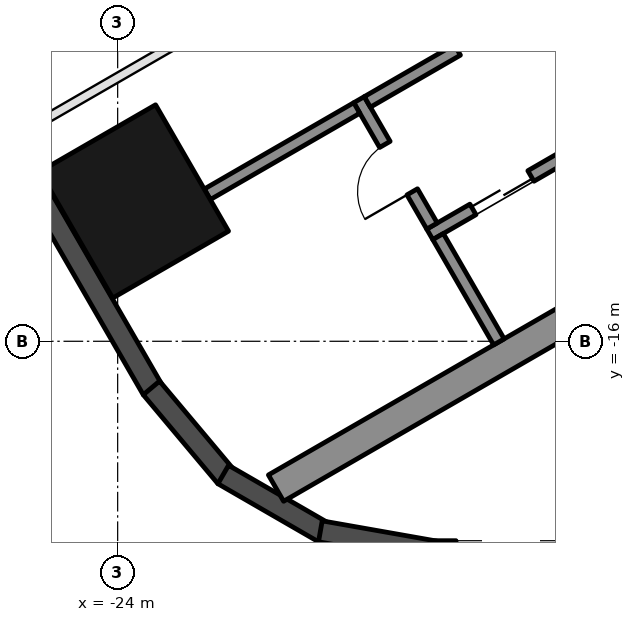
"""IFC4 building model, lengths in metres.
Left out: names, types, materials, properties, quantities, classifications, styles, units other than length and angle.
Written with IfcOpenShell. Run it as: python <this file> out.ifc"""

import sys

from ifc_helpers import new_model, si_unit, direction, frame, frame_2d, origin, origin_2d, place, context, subcontext, project, spatial, rectangle, hollow_rectangle, extrude, element, fill, save


model = new_model("IFC4")
c1 = context("Model", 3, precision=1e-05, world=origin(), true_north=direction((0.0, 1.0)))
c2 = subcontext(c1, "Body", "Model", "MODEL_VIEW")
j1 = project(units=[si_unit("LENGTHUNIT", "METRE"), si_unit("PLANEANGLEUNIT", "RADIAN")], contexts=[c1])
p1 = place(None, origin())
s1 = spatial("IfcSite", under=j1, at=p1, CompositionType="ELEMENT")
p2 = place(p1, origin())
s2 = spatial("IfcBuilding", under=s1, at=p2, CompositionType="ELEMENT")
p3 = place(p2, frame((0.0, 0.0, 157.7)))
s3 = spatial("IfcBuildingStorey", under=s2, at=p3, CompositionType="ELEMENT", Elevation=157.7)
p4 = place(p3, frame((-23.729, -13.7, 0.0), z_axis=(0.0, 0.0, 1.0), x_axis=(-0.5, 0.866025403784, 0.0)))
e1 = element("IfcColumn", 1, at=p4, inside=s3, PredefinedType="COLUMN", context=c2, shape_type="SweptSolid", body=[
    extrude(hollow_rectangle(XDim=2.4, YDim=2.2, WallThickness=0.06, at=origin_2d()), origin(), (0.0, 0.0, 1.0), 3.7),
])
p5 = place(p3, frame((-26.257, -11.893, 0.0), z_axis=(0.0, 0.0, 1.0), x_axis=(0.500018773155, -0.866014564827, 0.0)))
e2 = element("IfcWall", 2, at=p5, inside=s3, PredefinedType="SOLIDWALL", context=c2, shape_type="SweptSolid", body=[
    extrude(rectangle(XDim=5.658, YDim=0.35, at=frame_2d((2.829, 0.0))), origin(), (0.0, 0.0, 1.0), 3.55),
])
for number, where, z_axis, x_axis in (
    (3, (-23.445, -16.768, 0.0), (0.0, 0.0, 1.0), (0.643, -0.766, 0.0)),
    (4, (-22.264, -18.192, 0.0), (0.0, 0.0, 1.0), (0.866, -0.5, 0.0)),
):
    element("IfcWall", number, at=place(p3, frame(where, z_axis=z_axis, x_axis=x_axis)), inside=s3, PredefinedType="SOLIDWALL", context=c2, shape_type="SweptSolid", body=[
        extrude(rectangle(XDim=1.91, YDim=0.35, at=frame_2d((0.955, 0.0))), origin(), (0.0, 0.0, 1.0), 3.55),
    ])
p6 = place(p3, frame((-20.667, -19.126, 0.0), z_axis=(0.0, 0.0, 1.0), x_axis=(0.984798995425, -0.173697837091, 0.0)))
e5 = element("IfcWall", 5, at=p6, inside=s3, PredefinedType="SOLIDWALL", context=c2, shape_type="SweptSolid", body=[
    extrude(rectangle(XDim=1.91, YDim=0.35, at=frame_2d((0.955, 0.0))), origin(), (0.0, 0.0, 1.0), 3.55),
])
p7 = place(p3, frame((-18.816, -19.455, 0.0), z_axis=(0.0, 0.0, 1.0), x_axis=(1.0, 0.0, 0.0)))
e6 = element("IfcWall", 6, at=p7, inside=s3, PredefinedType="SOLIDWALL", context=c2, shape_type="SweptSolid", body=[
    extrude(rectangle(XDim=11.816, YDim=0.35, at=frame_2d((5.908, 0.0))), origin(), (0.0, 0.0, 1.0), 3.55),
])
p8 = place(p7, frame((0.381, 0.0, 0.3)))
e7 = element("IfcOpeningElement", 7, at=p8, cuts=e6, PredefinedType="OPENING", context=c2, shape_type="SweptSolid", body=[
    extrude(rectangle(XDim=1.8, YDim=2.65, at=frame_2d((0.9, 1.325))), frame((0.0, 0.185, 0.0), z_axis=(0.0, -1.0, 0.0), x_axis=(1.0, 0.0, 0.0)), (0.0, 0.0, 1.0), 0.37),
])
p9 = place(p7, frame((7.74, 0.0, 0.0)))
e8 = element("IfcOpeningElement", 8, at=p9, cuts=e6, PredefinedType="OPENING", context=c2, shape_type="SweptSolid", body=[
    extrude(rectangle(XDim=2.4, YDim=2.4, at=frame_2d((1.2, 1.2))), frame((0.0, 0.185, 0.0), z_axis=(0.0, -1.0, 0.0), x_axis=(1.0, 0.0, 0.0)), (0.0, 0.0, 1.0), 0.37),
])
p10 = place(p7, frame((3.791, 0.0, 0.3)))
e9 = element("IfcOpeningElement", 9, at=p10, cuts=e6, PredefinedType="OPENING", context=c2, shape_type="SweptSolid", body=[
    extrude(rectangle(XDim=1.6, YDim=2.65, at=frame_2d((0.8, 1.325))), frame((0.0, 0.185, 0.0), z_axis=(0.0, -1.0, 0.0), x_axis=(1.0, 0.0, 0.0)), (0.0, 0.0, 1.0), 0.37),
])
p11 = place(p7, frame((5.691, 0.0, 0.3)))
e10 = element("IfcOpeningElement", 10, at=p11, cuts=e6, PredefinedType="OPENING", context=c2, shape_type="SweptSolid", body=[
    extrude(rectangle(XDim=1.6, YDim=2.65, at=frame_2d((0.8, 1.325))), frame((0.0, 0.185, 0.0), z_axis=(0.0, -1.0, 0.0), x_axis=(1.0, 0.0, 0.0)), (0.0, 0.0, 1.0), 0.37),
])
p12 = place(p3, frame((-8.547, -10.997, 0.0), z_axis=(0.0, 0.0, 1.0), x_axis=(-0.866025009528, -0.500000682871, 0.0)))
e11 = element("IfcWall", 11, at=p12, inside=s3, PredefinedType="SHEAR", context=c2, shape_type="SweptSolid", body=[
    extrude(rectangle(XDim=14.837, YDim=0.5, at=frame_2d((7.418, 0.0))), origin(), (0.0, 0.0, 1.0), 3.5),
])
p13 = place(p3, frame((-10.068, -9.162, 0.0), z_axis=(0.0, 0.0, 1.0), x_axis=(-0.866032725843, -0.499987317609, 0.0)))
e12 = element("IfcWall", 12, at=p13, inside=s3, PredefinedType="SHEAR", context=c2, shape_type="SweptSolid", body=[
    extrude(rectangle(XDim=10.16, YDim=0.2, at=frame_2d((5.08, 0.0))), origin(), (0.0, 0.0, 1.0), 3.5),
])
p14 = place(p13, frame((0.62, 0.0, 0.0)))
e13 = element("IfcOpeningElement", 13, at=p14, cuts=e12, PredefinedType="OPENING", context=c2, shape_type="SweptSolid", body=[
    extrude(rectangle(XDim=1.1, YDim=2.1, at=frame_2d((0.55, 1.05))), frame((0.0, 0.11, 0.0), z_axis=(0.0, -1.0, 0.0), x_axis=(1.0, 0.0, 0.0)), (0.0, 0.0, 1.0), 0.22),
])
p15 = place(p13, frame((3.16, 0.0, 0.0)))
e14 = element("IfcOpeningElement", 14, at=p15, cuts=e12, PredefinedType="OPENING", context=c2, shape_type="SweptSolid", body=[
    extrude(rectangle(XDim=1.1, YDim=2.1, at=frame_2d((0.55, 1.05))), frame((0.0, 0.11, 0.0), z_axis=(0.0, -1.0, 0.0), x_axis=(1.0, 0.0, 0.0)), (0.0, 0.0, 1.0), 0.22),
])
p16 = place(p13, frame((5.7, 0.0, 0.0)))
e15 = element("IfcOpeningElement", 15, at=p16, cuts=e12, PredefinedType="OPENING", context=c2, shape_type="SweptSolid", body=[
    extrude(rectangle(XDim=1.1, YDim=2.1, at=frame_2d((0.55, 1.05))), frame((0.0, 0.11, 0.0), z_axis=(0.0, -1.0, 0.0), x_axis=(1.0, 0.0, 0.0)), (0.0, 0.0, 1.0), 0.22),
])
p17 = place(p13, frame((8.24, 0.0, 0.0)))
e16 = element("IfcOpeningElement", 16, at=p17, cuts=e12, PredefinedType="OPENING", context=c2, shape_type="SweptSolid", body=[
    extrude(rectangle(XDim=1.1, YDim=2.1, at=frame_2d((0.55, 1.05))), frame((0.0, 0.11, 0.0), z_axis=(0.0, -1.0, 0.0), x_axis=(1.0, 0.0, 0.0)), (0.0, 0.0, 1.0), 0.22),
])
p18 = place(p3, frame((-20.031, -12.026, 0.0), z_axis=(0.0, 0.0, 1.0), x_axis=(0.500033551112, -0.866006032174, 0.0)))
e17 = element("IfcWall", 17, at=p18, inside=s3, PredefinedType="SHEAR", context=c2, shape_type="SweptSolid", body=[
    extrude(rectangle(XDim=2.4, YDim=0.2, at=frame_2d((1.2, 0.0))), origin(), (0.0, 0.0, 1.0), 3.5),
])
p19 = place(p18, frame((0.85, 0.0, 0.0)))
e18 = element("IfcOpeningElement", 18, at=p19, cuts=e17, PredefinedType="OPENING", context=c2, shape_type="SweptSolid", body=[
    extrude(rectangle(XDim=0.9, YDim=2.1, at=frame_2d((0.45, 1.05))), frame((0.0, 0.11, 0.0), z_axis=(0.0, -1.0, 0.0), x_axis=(1.0, 0.0, 0.0)), (0.0, 0.0, 1.0), 0.22),
])
p20 = place(p3, frame((-18.413, -11.208, 0.0), z_axis=(0.0, 0.0, 1.0), x_axis=(-0.866038183914, -0.499977863513, 0.0)))
e19 = element("IfcWall", 19, at=p20, inside=s3, PredefinedType="SHEAR", context=c2, shape_type="SweptSolid", body=[
    extrude(rectangle(XDim=1.71, YDim=0.2, at=frame_2d((0.855, 0.0))), origin(), (0.0, 0.0, 1.0), 3.5),
])
p21 = place(p3, frame((-18.73, -14.278, 0.0), z_axis=(0.0, 0.0, 1.0), x_axis=(0.50002537861, -0.866010750942, 0.0)))
e20 = element("IfcWall", 20, at=p21, inside=s3, PredefinedType="SHEAR", context=c2, shape_type="SweptSolid", body=[
    extrude(rectangle(XDim=2.0, YDim=0.2, at=frame_2d((1.0, 0.0))), origin(), (0.0, 0.0, 1.0), 3.5),
])
p22 = place(p3, frame((-20.067, -12.163, 0.0), z_axis=(0.0, 0.0, 1.0), x_axis=(-0.866055327414, -0.49994816717, 0.0)))
e21 = element("IfcWall", 21, at=p22, inside=s3, PredefinedType="SHEAR", context=c2, shape_type="SweptSolid", body=[
    extrude(rectangle(XDim=2.84, YDim=0.2, at=frame_2d((1.42, 0.0))), origin(), (0.0, 0.0, 1.0), 3.5),
])
p23 = place(p3, frame((-19.613, -9.13, 0.0), z_axis=(0.0, 0.0, 1.0), x_axis=(-0.866031734426, -0.499989034847, 0.0)))
e22 = element("IfcWall", 22, at=p23, inside=s3, PredefinedType="PARTITIONING", context=c2, shape_type="SweptSolid", body=[
    extrude(rectangle(XDim=6.95, YDim=0.15, at=frame_2d((3.475, 0.0))), origin(), (0.0, 0.0, 1.0), 3.5),
])
p24 = place(p17, origin())
e23 = element("IfcDoor", 23, at=p24, inside=s3, OperationType="DOUBLE_DOOR_SLIDING", PredefinedType="DOOR", context=c2, shape_type="SweptSolid", body=[
    extrude(rectangle(XDim=1.1, YDim=2.1, at=frame_2d((0.55, 1.05))), frame((0.0, 0.025, 0.0), z_axis=(0.0, -1.0, 0.0), x_axis=(1.0, 0.0, 0.0)), (0.0, 0.0, 1.0), 0.05),
])
fill(e16, e23)
p25 = place(p19, frame((0.9, 0.0, 0.0), z_axis=(0.0, 0.0, 1.0), x_axis=(-1.0, 0.0, 0.0)))
e24 = element("IfcDoor", 24, at=p25, inside=s3, OperationType="SINGLE_SWING_LEFT", PredefinedType="DOOR", context=c2, shape_type="SweptSolid", body=[
    extrude(rectangle(XDim=0.9, YDim=2.1, at=frame_2d((0.45, 1.05))), frame((0.0, 0.025, 0.0), z_axis=(0.0, -1.0, 0.0), x_axis=(1.0, 0.0, 0.0)), (0.0, 0.0, 1.0), 0.05),
])
fill(e18, e24)
save(model, sys.argv[1])
